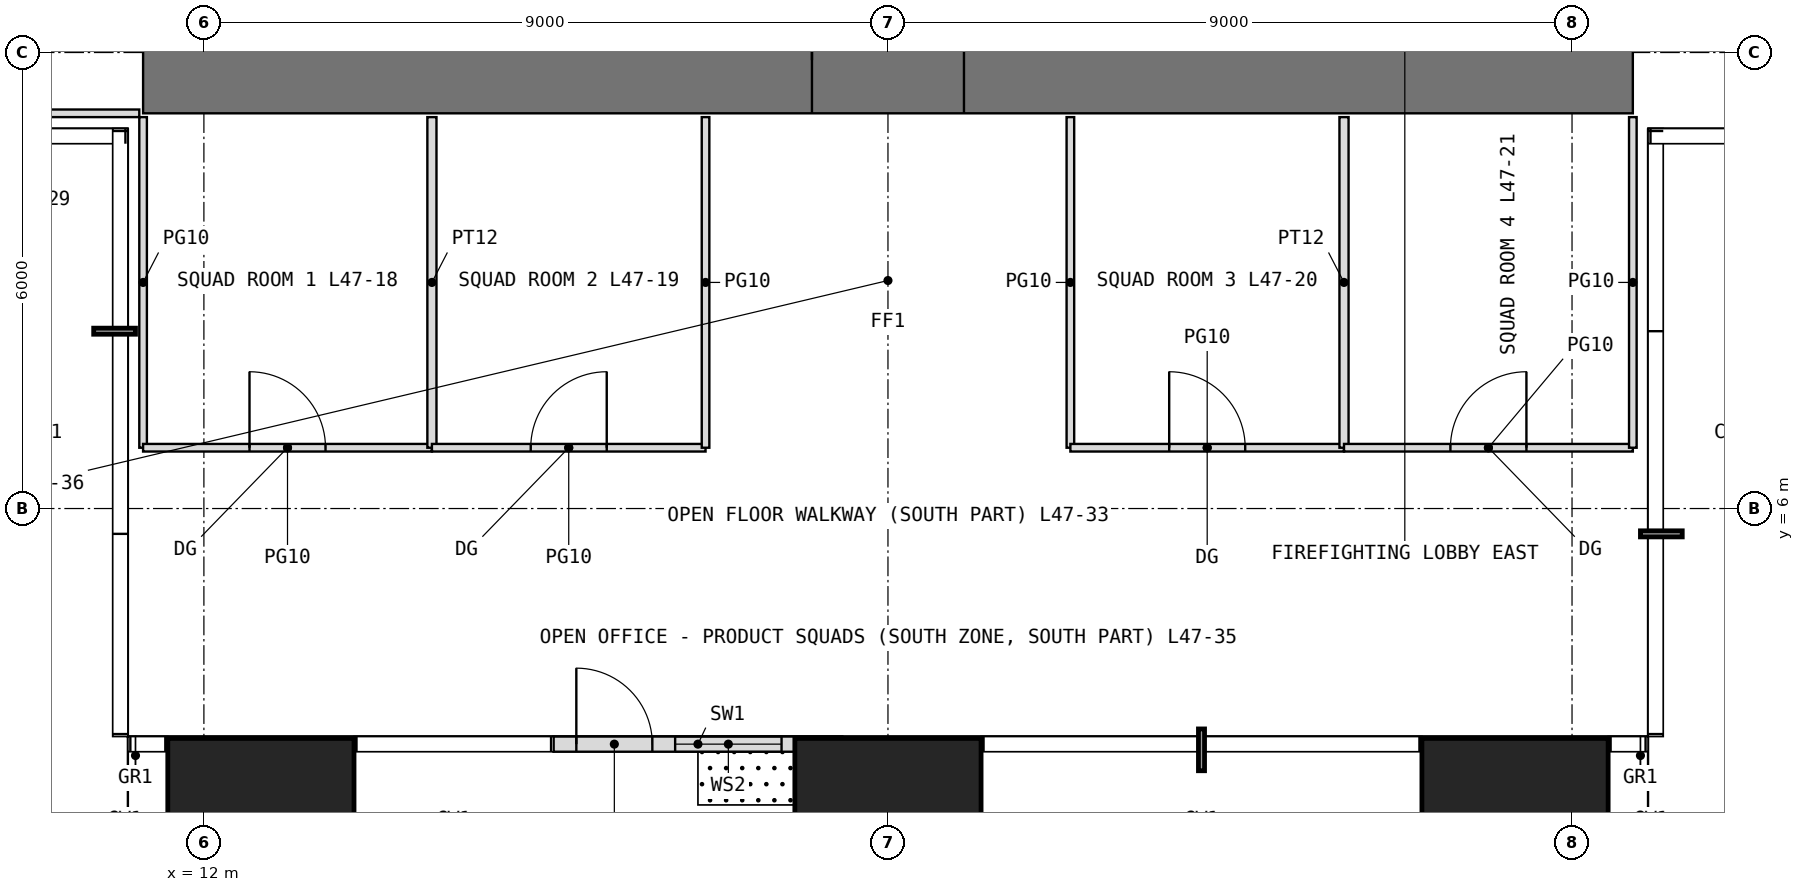
"""IFC4 building model, lengths in metres.
Left out: names, types, materials, properties, quantities, classifications, styles, units other than length and angle.
Written with IfcOpenShell. Run it as: python <this file> out.ifc"""

import sys

from ifc_helpers import new_model, si_unit, direction, frame, frame_2d, origin, origin_2d, place, context, subcontext, project, spatial, rectangle, extrude, element, fill, save


model = new_model("IFC4")
c1 = context("Model", 3, precision=1e-05, world=origin(), true_north=direction((0.0, 1.0)))
c2 = subcontext(c1, "Body", "Model", "MODEL_VIEW")
j1 = project(units=[si_unit("LENGTHUNIT", "METRE"), si_unit("PLANEANGLEUNIT", "RADIAN")], contexts=[c1])
p1 = place(None, origin())
s1 = spatial("IfcSite", under=j1, at=p1, CompositionType="ELEMENT")
p2 = place(p1, origin())
s2 = spatial("IfcBuilding", under=s1, at=p2, CompositionType="ELEMENT")
p3 = place(p2, frame((0.0, 0.0, 198.5)))
s3 = spatial("IfcBuildingStorey", under=s2, at=p3, CompositionType="ELEMENT", Elevation=198.5)
for number, where, z_axis, x_axis in (
    (1, (12.75, 1.75, 0.0), (0.0, 0.0, 1.0), (1.0, 0.0, 0.0)),
    (2, (21.0, 1.75, 0.0), (0.0, 0.0, 1.0), (1.0, 0.0, 0.0)),
    (3, (29.25, 1.75, 0.0), (0.0, 0.0, 1.0), (1.0, 0.0, 0.0)),
):
    element("IfcColumn", number, at=place(p3, frame(where, z_axis=z_axis, x_axis=x_axis)), inside=s3, PredefinedType="COLUMN", context=c2, shape_type="SweptSolid", body=[
        extrude(rectangle(XDim=2.45, YDim=2.45, at=origin_2d()), origin(), (0.0, 0.0, 1.0), 4.0),
    ])
p4 = place(p3, frame((16.6, 2.9, 0.0), z_axis=(0.0, 0.0, 1.0), x_axis=(1.0, 0.0, 0.0)))
e4 = element("IfcWall", 4, at=p4, inside=s3, PredefinedType="USERDEFINED", context=c2, shape_type="SweptSolid", body=[
    extrude(rectangle(XDim=3.8, YDim=0.2, at=frame_2d((1.9, 0.0))), origin(), (0.0, 0.0, 1.0), 3.75),
])
p5 = place(p4, frame((0.3, 0.0, 0.0)))
e5 = element("IfcOpeningElement", 5, at=p5, cuts=e4, PredefinedType="OPENING", context=c2, shape_type="SweptSolid", body=[
    extrude(rectangle(XDim=1.0, YDim=2.4, at=frame_2d((0.5, 1.2))), frame((0.0, 0.11, 0.0), z_axis=(0.0, -1.0, 0.0), x_axis=(1.0, 0.0, 0.0)), (0.0, 0.0, 1.0), 0.22),
])
p6 = place(p4, frame((1.6, 0.0, 0.3)))
e6 = element("IfcOpeningElement", 6, at=p6, cuts=e4, PredefinedType="OPENING", context=c2, shape_type="SweptSolid", body=[
    extrude(rectangle(XDim=1.4, YDim=2.7, at=frame_2d((0.7, 1.35))), frame((0.0, 0.11, 0.0), z_axis=(0.0, -1.0, 0.0), x_axis=(1.0, 0.0, 0.0)), (0.0, 0.0, 1.0), 0.22),
])
p7 = place(p3, frame((11.2, 11.9, -0.05), z_axis=(0.0, 0.0, 1.0), x_axis=(1.0, 0.0, 0.0)))
e7 = element("IfcWall", 7, at=p7, inside=s3, PredefinedType="SHEAR", context=c2, shape_type="SweptSolid", body=[
    extrude(rectangle(XDim=19.6, YDim=1.4, at=frame_2d((9.8, 0.0))), origin(), (0.0, 0.0, 1.0), 4.0),
])
p8 = place(p7, frame((8.8, 0.0, 0.05)))
e8 = element("IfcOpeningElement", 8, at=p8, cuts=e7, PredefinedType="OPENING", context=c2, shape_type="SweptSolid", body=[
    extrude(rectangle(XDim=2.0, YDim=2.2, at=frame_2d((1.0, 1.1))), frame((0.0, 0.71, 0.0), z_axis=(0.0, -1.0, 0.0), x_axis=(1.0, 0.0, 0.0)), (0.0, 0.0, 1.0), 1.42),
])
p9 = place(p3, frame((8.4, 11.2, 0.0), z_axis=(0.0, 0.0, 1.0), x_axis=(1.0, 0.0, 0.0)))
e9 = element("IfcWall", 9, at=p9, inside=s3, PredefinedType="PARTITIONING", context=c2, shape_type="SweptSolid", body=[
    extrude(rectangle(XDim=2.75, YDim=0.1, at=frame_2d((1.375, 0.0))), origin(), (0.0, 0.0, 1.0), 3.75),
])
p10 = place(p3, frame((11.2, 6.8, 0.0), z_axis=(0.0, 0.0, 1.0), x_axis=(0.0, 1.0, 0.0)))
e10 = element("IfcWall", 10, at=p10, inside=s3, PredefinedType="PARTITIONING", context=c2, shape_type="SweptSolid", body=[
    extrude(rectangle(XDim=4.35, YDim=0.1, at=frame_2d((2.175, 0.0))), origin(), (0.0, 0.0, 1.0), 3.75),
])
p11 = place(p3, frame((11.2, 6.8, 0.0), z_axis=(0.0, 0.0, 1.0), x_axis=(1.0, 0.0, 0.0)))
e11 = element("IfcWall", 11, at=p11, inside=s3, PredefinedType="PARTITIONING", context=c2, shape_type="SweptSolid", body=[
    extrude(rectangle(XDim=3.8, YDim=0.1, at=frame_2d((1.9, 0.0))), origin(), (0.0, 0.0, 1.0), 3.75),
])
p12 = place(p11, frame((1.4, 0.0, 0.0)))
e12 = element("IfcOpeningElement", 12, at=p12, cuts=e11, PredefinedType="OPENING", context=c2, shape_type="SweptSolid", body=[
    extrude(rectangle(XDim=1.0, YDim=2.4, at=frame_2d((0.5, 1.2))), frame((0.0, 0.06, 0.0), z_axis=(0.0, -1.0, 0.0), x_axis=(1.0, 0.0, 0.0)), (0.0, 0.0, 1.0), 0.12),
])
p13 = place(p3, frame((15.0, 6.8, 0.0), z_axis=(0.0, 0.0, 1.0), x_axis=(0.0, 1.0, 0.0)))
e13 = element("IfcWall", 13, at=p13, inside=s3, PredefinedType="PARTITIONING", context=c2, shape_type="SweptSolid", body=[
    extrude(rectangle(XDim=4.35, YDim=0.12, at=frame_2d((2.175, 0.0))), origin(), (0.0, 0.0, 1.0), 3.75),
])
p14 = place(p3, frame((15.0, 6.8, 0.0), z_axis=(0.0, 0.0, 1.0), x_axis=(1.0, 0.0, 0.0)))
e14 = element("IfcWall", 14, at=p14, inside=s3, PredefinedType="PARTITIONING", context=c2, shape_type="SweptSolid", body=[
    extrude(rectangle(XDim=3.6, YDim=0.1, at=frame_2d((1.8, 0.0))), origin(), (0.0, 0.0, 1.0), 3.75),
])
p15 = place(p14, frame((1.3, 0.0, 0.0)))
e15 = element("IfcOpeningElement", 15, at=p15, cuts=e14, PredefinedType="OPENING", context=c2, shape_type="SweptSolid", body=[
    extrude(rectangle(XDim=1.0, YDim=2.4, at=frame_2d((0.5, 1.2))), frame((0.0, 0.06, 0.0), z_axis=(0.0, -1.0, 0.0), x_axis=(1.0, 0.0, 0.0)), (0.0, 0.0, 1.0), 0.12),
])
for number, where, z_axis, x_axis in (
    (16, (18.6, 6.8, 0.0), (0.0, 0.0, 1.0), (0.0, 1.0, 0.0)),
    (17, (23.4, 6.8, 0.0), (0.0, 0.0, 1.0), (0.0, 1.0, 0.0)),
):
    element("IfcWall", number, at=place(p3, frame(where, z_axis=z_axis, x_axis=x_axis)), inside=s3, PredefinedType="PARTITIONING", context=c2, shape_type="SweptSolid", body=[
        extrude(rectangle(XDim=4.35, YDim=0.1, at=frame_2d((2.175, 0.0))), origin(), (0.0, 0.0, 1.0), 3.75),
    ])
p16 = place(p3, frame((23.4, 6.8, 0.0), z_axis=(0.0, 0.0, 1.0), x_axis=(1.0, 0.0, 0.0)))
e18 = element("IfcWall", 18, at=p16, inside=s3, PredefinedType="PARTITIONING", context=c2, shape_type="SweptSolid", body=[
    extrude(rectangle(XDim=3.6, YDim=0.1, at=frame_2d((1.8, 0.0))), origin(), (0.0, 0.0, 1.0), 3.75),
])
p17 = place(p16, frame((1.3, 0.0, 0.0)))
e19 = element("IfcOpeningElement", 19, at=p17, cuts=e18, PredefinedType="OPENING", context=c2, shape_type="SweptSolid", body=[
    extrude(rectangle(XDim=1.0, YDim=2.4, at=frame_2d((0.5, 1.2))), frame((0.0, 0.06, 0.0), z_axis=(0.0, -1.0, 0.0), x_axis=(1.0, 0.0, 0.0)), (0.0, 0.0, 1.0), 0.12),
])
p18 = place(p3, frame((27.0, 6.8, 0.0), z_axis=(0.0, 0.0, 1.0), x_axis=(0.0, 1.0, 0.0)))
e20 = element("IfcWall", 20, at=p18, inside=s3, PredefinedType="PARTITIONING", context=c2, shape_type="SweptSolid", body=[
    extrude(rectangle(XDim=4.35, YDim=0.12, at=frame_2d((2.175, 0.0))), origin(), (0.0, 0.0, 1.0), 3.75),
])
p19 = place(p3, frame((27.0, 6.8, 0.0), z_axis=(0.0, 0.0, 1.0), x_axis=(1.0, 0.0, 0.0)))
e21 = element("IfcWall", 21, at=p19, inside=s3, PredefinedType="PARTITIONING", context=c2, shape_type="SweptSolid", body=[
    extrude(rectangle(XDim=3.8, YDim=0.1, at=frame_2d((1.9, 0.0))), origin(), (0.0, 0.0, 1.0), 3.75),
])
p20 = place(p19, frame((1.4, 0.0, 0.0)))
e22 = element("IfcOpeningElement", 22, at=p20, cuts=e21, PredefinedType="OPENING", context=c2, shape_type="SweptSolid", body=[
    extrude(rectangle(XDim=1.0, YDim=2.4, at=frame_2d((0.5, 1.2))), frame((0.0, 0.06, 0.0), z_axis=(0.0, -1.0, 0.0), x_axis=(1.0, 0.0, 0.0)), (0.0, 0.0, 1.0), 0.12),
])
p21 = place(p3, frame((30.8, 6.8, 0.0), z_axis=(0.0, 0.0, 1.0), x_axis=(0.0, 1.0, 0.0)))
e23 = element("IfcWall", 23, at=p21, inside=s3, PredefinedType="PARTITIONING", context=c2, shape_type="SweptSolid", body=[
    extrude(rectangle(XDim=4.35, YDim=0.1, at=frame_2d((2.175, 0.0))), origin(), (0.0, 0.0, 1.0), 3.75),
])
p22 = place(p5, origin())
e24 = element("IfcDoor", 24, at=p22, inside=s3, OperationType="SINGLE_SWING_LEFT", PredefinedType="DOOR", context=c2, shape_type="SweptSolid", body=[
    extrude(rectangle(XDim=1.0, YDim=2.4, at=frame_2d((0.5, 1.2))), frame((0.0, 0.025, 0.0), z_axis=(0.0, -1.0, 0.0), x_axis=(1.0, 0.0, 0.0)), (0.0, 0.0, 1.0), 0.05),
])
fill(e5, e24)
p23 = place(p6, origin())
e25 = element("IfcWindow", 25, at=p23, inside=s3, PartitioningType="SINGLE_PANEL", PredefinedType="WINDOW", context=c2, shape_type="SweptSolid", body=[
    extrude(rectangle(XDim=1.4, YDim=2.7, at=frame_2d((0.7, 1.35))), frame((0.0, 0.03, 0.0), z_axis=(0.0, -1.0, 0.0), x_axis=(1.0, 0.0, 0.0)), (0.0, 0.0, 1.0), 0.06),
])
fill(e6, e25)
p24 = place(p8, origin())
e26 = element("IfcDoor", 26, at=p24, inside=s3, OperationType="DOUBLE_DOOR_SINGLE_SWING", PredefinedType="DOOR", context=c2, shape_type="SweptSolid", body=[
    extrude(rectangle(XDim=2.0, YDim=2.2, at=frame_2d((1.0, 1.1))), frame((0.0, 0.025, 0.0), z_axis=(0.0, -1.0, 0.0), x_axis=(1.0, 0.0, 0.0)), (0.0, 0.0, 1.0), 0.05),
])
fill(e8, e26)
p25 = place(p12, origin())
e27 = element("IfcDoor", 27, at=p25, inside=s3, OperationType="SINGLE_SWING_LEFT", PredefinedType="DOOR", context=c2, shape_type="SweptSolid", body=[
    extrude(rectangle(XDim=1.0, YDim=2.4, at=frame_2d((0.5, 1.2))), frame((0.0, 0.025, 0.0), z_axis=(0.0, -1.0, 0.0), x_axis=(1.0, 0.0, 0.0)), (0.0, 0.0, 1.0), 0.05),
])
fill(e12, e27)
p26 = place(p15, origin())
e28 = element("IfcDoor", 28, at=p26, inside=s3, OperationType="SINGLE_SWING_RIGHT", PredefinedType="DOOR", context=c2, shape_type="SweptSolid", body=[
    extrude(rectangle(XDim=1.0, YDim=2.4, at=frame_2d((0.5, 1.2))), frame((0.0, 0.025, 0.0), z_axis=(0.0, -1.0, 0.0), x_axis=(1.0, 0.0, 0.0)), (0.0, 0.0, 1.0), 0.05),
])
fill(e15, e28)
p27 = place(p17, origin())
e29 = element("IfcDoor", 29, at=p27, inside=s3, OperationType="SINGLE_SWING_LEFT", PredefinedType="DOOR", context=c2, shape_type="SweptSolid", body=[
    extrude(rectangle(XDim=1.0, YDim=2.4, at=frame_2d((0.5, 1.2))), frame((0.0, 0.025, 0.0), z_axis=(0.0, -1.0, 0.0), x_axis=(1.0, 0.0, 0.0)), (0.0, 0.0, 1.0), 0.05),
])
fill(e19, e29)
p28 = place(p20, origin())
e30 = element("IfcDoor", 30, at=p28, inside=s3, OperationType="SINGLE_SWING_RIGHT", PredefinedType="DOOR", context=c2, shape_type="SweptSolid", body=[
    extrude(rectangle(XDim=1.0, YDim=2.4, at=frame_2d((0.5, 1.2))), frame((0.0, 0.025, 0.0), z_axis=(0.0, -1.0, 0.0), x_axis=(1.0, 0.0, 0.0)), (0.0, 0.0, 1.0), 0.05),
])
fill(e22, e30)
save(model, sys.argv[1])
